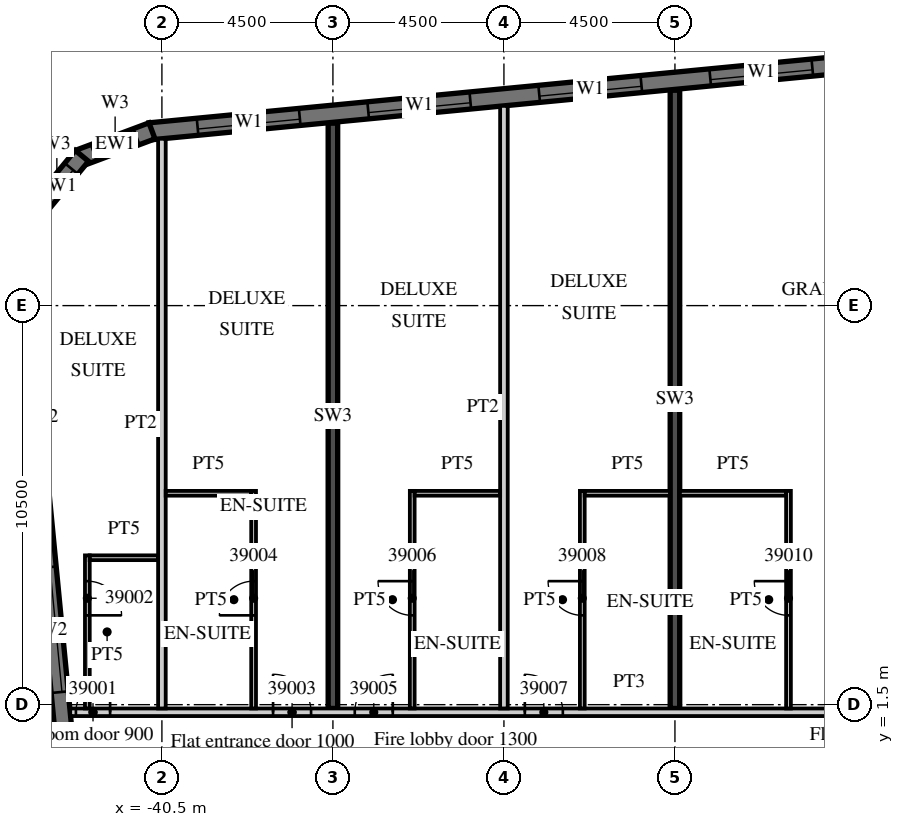
"""IFC4 building model, lengths in metres.
Left out: names, types, materials, properties, quantities, classifications, styles, units other than length and angle.
Written with IfcOpenShell. Run it as: python <this file> out.ifc"""

import sys

from ifc_helpers import new_model, si_unit, direction, frame, frame_2d, origin, place, context, subcontext, project, spatial, polyline, rectangle, outline, extrude, element, fill, save


model = new_model("IFC4")
c1 = context("Model", 3, precision=1e-05, world=origin(), true_north=direction((0.0, 1.0)))
c2 = subcontext(c1, "Body", "Model", "MODEL_VIEW")
j1 = project(units=[si_unit("LENGTHUNIT", "METRE"), si_unit("PLANEANGLEUNIT", "RADIAN")], contexts=[c1])
p1 = place(None, origin())
s1 = spatial("IfcSite", under=j1, at=p1, CompositionType="ELEMENT")
p2 = place(p1, origin())
s2 = spatial("IfcBuilding", under=s1, at=p2, CompositionType="ELEMENT")
p3 = place(p2, frame((0.0, 0.0, 170.2)))
s3 = spatial("IfcBuildingStorey", under=s2, at=p3, CompositionType="ELEMENT", Elevation=170.2)
p4 = place(p3, frame((-36.0, 1.4, 0.0), z_axis=(0.0, 0.0, 1.0), x_axis=(0.0, 1.0, 0.0)))
e1 = element("IfcWall", 1, at=p4, inside=s3, PredefinedType="SHEAR", context=c2, shape_type="SweptSolid", body=[
    extrude(rectangle(XDim=15.401, YDim=0.25, at=frame_2d((7.701, 0.0))), origin(), (0.0, 0.0, 1.0), 3.3),
])
p5 = place(p3, frame((-27.0, 1.4, 0.0), z_axis=(0.0, 0.0, 1.0), x_axis=(0.0, 1.0, 0.0)))
e2 = element("IfcWall", 2, at=p5, inside=s3, PredefinedType="SHEAR", context=c2, shape_type="SweptSolid", body=[
    extrude(rectangle(XDim=16.268, YDim=0.25, at=frame_2d((8.134, 0.0))), origin(), (0.0, 0.0, 1.0), 3.3),
])
p6 = place(p3, frame((-44.214, 12.466, 0.0), z_axis=(0.0, 0.0, 1.0), x_axis=(0.095847314626, -0.995396047952, 0.0)))
e3 = element("IfcWall", 3, at=p6, inside=s3, PredefinedType="SOLIDWALL", context=c2, shape_type="SweptSolid", body=[
    extrude(rectangle(XDim=34.0, YDim=0.45, at=frame_2d((17.0, 0.0))), origin(), (0.0, 0.0, 1.0), 3.02),
])
p7 = place(p6, frame((2.865, 0.0, 0.45)))
e4 = element("IfcOpeningElement", 4, at=p7, cuts=e3, PredefinedType="OPENING", context=c2, shape_type="SweptSolid", body=[
    extrude(rectangle(XDim=3.3, YDim=2.25, at=frame_2d((1.65, 1.125))), frame((0.0, 0.235, 0.0), z_axis=(0.0, -1.0, 0.0), x_axis=(1.0, 0.0, 0.0)), (0.0, 0.0, 1.0), 0.47),
])
p8 = place(p6, frame((7.386, 0.0, 0.45)))
e5 = element("IfcOpeningElement", 5, at=p8, cuts=e3, PredefinedType="OPENING", context=c2, shape_type="SweptSolid", body=[
    extrude(rectangle(XDim=3.3, YDim=2.25, at=frame_2d((1.65, 1.125))), frame((0.0, 0.235, 0.0), z_axis=(0.0, -1.0, 0.0), x_axis=(1.0, 0.0, 0.0)), (0.0, 0.0, 1.0), 0.47),
])
p9 = place(p3, frame((13.521, 21.817, 0.0), z_axis=(0.0, 0.0, 1.0), x_axis=(-0.995396508751, -0.095842529008, 0.0)))
e6 = element("IfcWall", 6, at=p9, inside=s3, PredefinedType="SOLIDWALL", context=c2, shape_type="SweptSolid", body=[
    extrude(rectangle(XDim=54.591, YDim=0.45, at=frame_2d((27.296, 0.0))), origin(), (0.0, 0.0, 1.0), 3.02),
])
p10 = place(p9, frame((0.91, 0.0, 0.45)))
e7 = element("IfcOpeningElement", 7, at=p10, cuts=e6, PredefinedType="OPENING", context=c2, shape_type="SweptSolid", body=[
    extrude(rectangle(XDim=2.7, YDim=2.25, at=frame_2d((1.35, 1.125))), frame((0.0, 0.235, 0.0), z_axis=(0.0, -1.0, 0.0), x_axis=(1.0, 0.0, 0.0)), (0.0, 0.0, 1.0), 0.47),
])
p11 = place(p9, frame((5.431, 0.0, 0.45)))
e8 = element("IfcOpeningElement", 8, at=p11, cuts=e6, PredefinedType="OPENING", context=c2, shape_type="SweptSolid", body=[
    extrude(rectangle(XDim=2.7, YDim=2.25, at=frame_2d((1.35, 1.125))), frame((0.0, 0.235, 0.0), z_axis=(0.0, -1.0, 0.0), x_axis=(1.0, 0.0, 0.0)), (0.0, 0.0, 1.0), 0.47),
])
p12 = place(p9, frame((9.952, 0.0, 0.45)))
e9 = element("IfcOpeningElement", 9, at=p12, cuts=e6, PredefinedType="OPENING", context=c2, shape_type="SweptSolid", body=[
    extrude(rectangle(XDim=2.7, YDim=2.25, at=frame_2d((1.35, 1.125))), frame((0.0, 0.235, 0.0), z_axis=(0.0, -1.0, 0.0), x_axis=(1.0, 0.0, 0.0)), (0.0, 0.0, 1.0), 0.47),
])
p13 = place(p9, frame((14.473, 0.0, 0.45)))
e10 = element("IfcOpeningElement", 10, at=p13, cuts=e6, PredefinedType="OPENING", context=c2, shape_type="SweptSolid", body=[
    extrude(rectangle(XDim=2.7, YDim=2.25, at=frame_2d((1.35, 1.125))), frame((0.0, 0.235, 0.0), z_axis=(0.0, -1.0, 0.0), x_axis=(1.0, 0.0, 0.0)), (0.0, 0.0, 1.0), 0.47),
])
p14 = place(p9, frame((18.994, 0.0, 0.45)))
e11 = element("IfcOpeningElement", 11, at=p14, cuts=e6, PredefinedType="OPENING", context=c2, shape_type="SweptSolid", body=[
    extrude(rectangle(XDim=2.7, YDim=2.25, at=frame_2d((1.35, 1.125))), frame((0.0, 0.235, 0.0), z_axis=(0.0, -1.0, 0.0), x_axis=(1.0, 0.0, 0.0)), (0.0, 0.0, 1.0), 0.47),
])
p15 = place(p9, frame((23.514, 0.0, 0.45)))
e12 = element("IfcOpeningElement", 12, at=p15, cuts=e6, PredefinedType="OPENING", context=c2, shape_type="SweptSolid", body=[
    extrude(rectangle(XDim=2.7, YDim=2.25, at=frame_2d((1.35, 1.125))), frame((0.0, 0.235, 0.0), z_axis=(0.0, -1.0, 0.0), x_axis=(1.0, 0.0, 0.0)), (0.0, 0.0, 1.0), 0.47),
])
p16 = place(p9, frame((28.035, 0.0, 0.45)))
e13 = element("IfcOpeningElement", 13, at=p16, cuts=e6, PredefinedType="OPENING", context=c2, shape_type="SweptSolid", body=[
    extrude(rectangle(XDim=2.7, YDim=2.25, at=frame_2d((1.35, 1.125))), frame((0.0, 0.235, 0.0), z_axis=(0.0, -1.0, 0.0), x_axis=(1.0, 0.0, 0.0)), (0.0, 0.0, 1.0), 0.47),
])
p17 = place(p9, frame((32.556, 0.0, 0.45)))
e14 = element("IfcOpeningElement", 14, at=p17, cuts=e6, PredefinedType="OPENING", context=c2, shape_type="SweptSolid", body=[
    extrude(rectangle(XDim=2.7, YDim=2.25, at=frame_2d((1.35, 1.125))), frame((0.0, 0.235, 0.0), z_axis=(0.0, -1.0, 0.0), x_axis=(1.0, 0.0, 0.0)), (0.0, 0.0, 1.0), 0.47),
])
p18 = place(p9, frame((37.077, 0.0, 0.45)))
e15 = element("IfcOpeningElement", 15, at=p18, cuts=e6, PredefinedType="OPENING", context=c2, shape_type="SweptSolid", body=[
    extrude(rectangle(XDim=2.7, YDim=2.25, at=frame_2d((1.35, 1.125))), frame((0.0, 0.235, 0.0), z_axis=(0.0, -1.0, 0.0), x_axis=(1.0, 0.0, 0.0)), (0.0, 0.0, 1.0), 0.47),
])
p19 = place(p9, frame((41.598, 0.0, 0.45)))
e16 = element("IfcOpeningElement", 16, at=p19, cuts=e6, PredefinedType="OPENING", context=c2, shape_type="SweptSolid", body=[
    extrude(rectangle(XDim=2.7, YDim=2.25, at=frame_2d((1.35, 1.125))), frame((0.0, 0.235, 0.0), z_axis=(0.0, -1.0, 0.0), x_axis=(1.0, 0.0, 0.0)), (0.0, 0.0, 1.0), 0.47),
])
p20 = place(p9, frame((46.118, 0.0, 0.45)))
e17 = element("IfcOpeningElement", 17, at=p20, cuts=e6, PredefinedType="OPENING", context=c2, shape_type="SweptSolid", body=[
    extrude(rectangle(XDim=2.7, YDim=2.25, at=frame_2d((1.35, 1.125))), frame((0.0, 0.235, 0.0), z_axis=(0.0, -1.0, 0.0), x_axis=(1.0, 0.0, 0.0)), (0.0, 0.0, 1.0), 0.47),
])
p21 = place(p9, frame((50.629, 0.0, 0.45)))
e18 = element("IfcOpeningElement", 18, at=p21, cuts=e6, PredefinedType="OPENING", context=c2, shape_type="SweptSolid", body=[
    extrude(rectangle(XDim=2.7, YDim=2.25, at=frame_2d((1.35, 1.125))), frame((0.0, 0.235, 0.0), z_axis=(0.0, -1.0, 0.0), x_axis=(1.0, 0.0, 0.0)), (0.0, 0.0, 1.0), 0.47),
])
p22 = place(p3, frame((-40.761, 16.598, 0.0), z_axis=(0.0, 0.0, 1.0), x_axis=(-0.936677599948, -0.350192909346, 0.0)))
e19 = element("IfcWall", 19, at=p22, inside=s3, PredefinedType="SOLIDWALL", context=c2, shape_type="SweptSolid", body=[
    extrude(outline(polyline([(0.0, -0.225), (2.071, -0.225), (1.95, 0.225), (0.121, 0.225), (0.0, -0.225)])), origin(), (0.0, 0.0, 1.0), 3.02),
])
p23 = place(p22, frame((0.435, 0.0, 0.45)))
e20 = element("IfcOpeningElement", 20, at=p23, cuts=e19, PredefinedType="OPENING", context=c2, shape_type="SweptSolid", body=[
    extrude(rectangle(XDim=1.2, YDim=2.25, at=frame_2d((0.6, 1.125))), frame((0.0, 0.235, 0.0), z_axis=(0.0, -1.0, 0.0), x_axis=(1.0, 0.0, 0.0)), (0.0, 0.0, 1.0), 0.47),
])
p24 = place(p3, frame((-42.606, 15.941, 0.0), z_axis=(0.0, 0.0, 1.0), x_axis=(-0.636116318187, -0.771593176315, 0.0)))
e21 = element("IfcWall", 21, at=p24, inside=s3, PredefinedType="SOLIDWALL", context=c2, shape_type="SweptSolid", body=[
    extrude(outline(polyline([(0.0, -0.225), (2.071, -0.225), (1.95, 0.225), (0.121, 0.225), (0.0, -0.225)])), origin(), (0.0, 0.0, 1.0), 3.02),
])
p25 = place(p24, frame((0.435, 0.0, 0.45)))
e22 = element("IfcOpeningElement", 22, at=p25, cuts=e21, PredefinedType="OPENING", context=c2, shape_type="SweptSolid", body=[
    extrude(rectangle(XDim=1.2, YDim=2.25, at=frame_2d((0.6, 1.125))), frame((0.0, 0.235, 0.0), z_axis=(0.0, -1.0, 0.0), x_axis=(1.0, 0.0, 0.0)), (0.0, 0.0, 1.0), 0.47),
])
p26 = place(p3, frame((-42.913, 1.3, 0.0), z_axis=(0.0, 0.0, 1.0), x_axis=(1.0, 0.0, 0.0)))
e23 = element("IfcWall", 23, at=p26, inside=s3, PredefinedType="PARTITIONING", context=c2, shape_type="SweptSolid", body=[
    extrude(rectangle(XDim=29.413, YDim=0.2, at=frame_2d((14.707, 0.0))), origin(), (0.0, 0.0, 1.0), 3.02),
])
p27 = place(p26, frame((0.15, 0.0, 0.0)))
e24 = element("IfcOpeningElement", 24, at=p27, cuts=e23, PredefinedType="OPENING", context=c2, shape_type="SweptSolid", body=[
    extrude(rectangle(XDim=0.9, YDim=2.1, at=frame_2d((0.45, 1.05))), frame((0.0, 0.11, 0.0), z_axis=(0.0, -1.0, 0.0), x_axis=(1.0, 0.0, 0.0)), (0.0, 0.0, 1.0), 0.22),
])
p28 = place(p26, frame((5.338, 0.0, 0.0)))
e25 = element("IfcOpeningElement", 25, at=p28, cuts=e23, PredefinedType="OPENING", context=c2, shape_type="SweptSolid", body=[
    extrude(rectangle(XDim=1.0, YDim=2.1, at=frame_2d((0.5, 1.05))), frame((0.0, 0.11, 0.0), z_axis=(0.0, -1.0, 0.0), x_axis=(1.0, 0.0, 0.0)), (0.0, 0.0, 1.0), 0.22),
])
p29 = place(p26, frame((7.488, 0.0, 0.0)))
e26 = element("IfcOpeningElement", 26, at=p29, cuts=e23, PredefinedType="OPENING", context=c2, shape_type="SweptSolid", body=[
    extrude(rectangle(XDim=1.0, YDim=2.1, at=frame_2d((0.5, 1.05))), frame((0.0, 0.11, 0.0), z_axis=(0.0, -1.0, 0.0), x_axis=(1.0, 0.0, 0.0)), (0.0, 0.0, 1.0), 0.22),
])
p30 = place(p26, frame((11.963, 0.0, 0.0)))
e27 = element("IfcOpeningElement", 27, at=p30, cuts=e23, PredefinedType="OPENING", context=c2, shape_type="SweptSolid", body=[
    extrude(rectangle(XDim=1.0, YDim=2.1, at=frame_2d((0.5, 1.05))), frame((0.0, 0.11, 0.0), z_axis=(0.0, -1.0, 0.0), x_axis=(1.0, 0.0, 0.0)), (0.0, 0.0, 1.0), 0.22),
])
p31 = place(p26, frame((21.275, 0.0, 0.0)))
e28 = element("IfcOpeningElement", 28, at=p31, cuts=e23, PredefinedType="OPENING", context=c2, shape_type="SweptSolid", body=[
    extrude(rectangle(XDim=1.2, YDim=2.1, at=frame_2d((0.6, 1.05))), frame((0.0, 0.11, 0.0), z_axis=(0.0, -1.0, 0.0), x_axis=(1.0, 0.0, 0.0)), (0.0, 0.0, 1.0), 0.22),
])
p32 = place(p26, frame((27.838, 0.0, 0.0)))
e29 = element("IfcOpeningElement", 29, at=p32, cuts=e23, PredefinedType="OPENING", context=c2, shape_type="SweptSolid", body=[
    extrude(rectangle(XDim=1.0, YDim=2.1, at=frame_2d((0.5, 1.05))), frame((0.0, 0.11, 0.0), z_axis=(0.0, -1.0, 0.0), x_axis=(1.0, 0.0, 0.0)), (0.0, 0.0, 1.0), 0.22),
])
p33 = place(p3, frame((-40.5, 1.4, 0.0), z_axis=(0.0, 0.0, 1.0), x_axis=(0.0, 1.0, 0.0)))
e30 = element("IfcWall", 30, at=p33, inside=s3, PredefinedType="PARTITIONING", context=c2, shape_type="SweptSolid", body=[
    extrude(rectangle(XDim=14.99, YDim=0.2, at=frame_2d((7.495, 0.0))), origin(), (0.0, 0.0, 1.0), 3.02),
])
p34 = place(p3, frame((-42.462, 1.4, 0.0), z_axis=(0.0, 0.0, 1.0), x_axis=(0.0, 1.0, 0.0)))
e31 = element("IfcWall", 31, at=p34, inside=s3, PredefinedType="PARTITIONING", context=c2, shape_type="SweptSolid", body=[
    extrude(rectangle(XDim=4.028, YDim=0.125, at=frame_2d((2.014, 0.0))), origin(), (0.0, 0.0, 1.0), 3.02),
])
p35 = place(p34, frame((2.45, 0.0, 0.0)))
e32 = element("IfcOpeningElement", 32, at=p35, cuts=e31, PredefinedType="OPENING", context=c2, shape_type="SweptSolid", body=[
    extrude(rectangle(XDim=0.9, YDim=2.1, at=frame_2d((0.45, 1.05))), frame((0.0, 0.073, 0.0), z_axis=(0.0, -1.0, 0.0), x_axis=(1.0, 0.0, 0.0)), (0.0, 0.0, 1.0), 0.145),
])
p36 = place(p3, frame((-42.4, 5.366, 0.0), z_axis=(0.0, 0.0, 1.0), x_axis=(1.0, 0.0, 0.0)))
e33 = element("IfcWall", 33, at=p36, inside=s3, PredefinedType="PARTITIONING", context=c2, shape_type="SweptSolid", body=[
    extrude(rectangle(XDim=1.8, YDim=0.125, at=frame_2d((0.9, 0.0))), origin(), (0.0, 0.0, 1.0), 3.02),
])
p37 = place(p3, frame((-38.087, 1.4, 0.0), z_axis=(0.0, 0.0, 1.0), x_axis=(0.0, 1.0, 0.0)))
e34 = element("IfcWall", 34, at=p37, inside=s3, PredefinedType="PARTITIONING", context=c2, shape_type="SweptSolid", body=[
    extrude(rectangle(XDim=5.725, YDim=0.125, at=frame_2d((2.863, 0.0))), origin(), (0.0, 0.0, 1.0), 3.02),
])
p38 = place(p37, frame((2.45, 0.0, 0.0)))
e35 = element("IfcOpeningElement", 35, at=p38, cuts=e34, PredefinedType="OPENING", context=c2, shape_type="SweptSolid", body=[
    extrude(rectangle(XDim=0.9, YDim=2.1, at=frame_2d((0.45, 1.05))), frame((0.0, 0.073, 0.0), z_axis=(0.0, -1.0, 0.0), x_axis=(1.0, 0.0, 0.0)), (0.0, 0.0, 1.0), 0.145),
])
p39 = place(p3, frame((-40.4, 7.062, 0.0), z_axis=(0.0, 0.0, 1.0), x_axis=(1.0, 0.0, 0.0)))
e36 = element("IfcWall", 36, at=p39, inside=s3, PredefinedType="PARTITIONING", context=c2, shape_type="SweptSolid", body=[
    extrude(rectangle(XDim=2.25, YDim=0.125, at=frame_2d((1.125, 0.0))), origin(), (0.0, 0.0, 1.0), 3.02),
])
p40 = place(p3, frame((-31.5, 1.4, 0.0), z_axis=(0.0, 0.0, 1.0), x_axis=(0.0, 1.0, 0.0)))
e37 = element("IfcWall", 37, at=p40, inside=s3, PredefinedType="PARTITIONING", context=c2, shape_type="SweptSolid", body=[
    extrude(rectangle(XDim=15.856, YDim=0.2, at=frame_2d((7.928, 0.0))), origin(), (0.0, 0.0, 1.0), 3.02),
])
p41 = place(p3, frame((-33.913, 1.4, 0.0), z_axis=(0.0, 0.0, 1.0), x_axis=(0.0, 1.0, 0.0)))
e38 = element("IfcWall", 38, at=p41, inside=s3, PredefinedType="PARTITIONING", context=c2, shape_type="SweptSolid", body=[
    extrude(rectangle(XDim=5.725, YDim=0.125, at=frame_2d((2.863, 0.0))), origin(), (0.0, 0.0, 1.0), 3.02),
])
p42 = place(p41, frame((2.45, 0.0, 0.0)))
e39 = element("IfcOpeningElement", 39, at=p42, cuts=e38, PredefinedType="OPENING", context=c2, shape_type="SweptSolid", body=[
    extrude(rectangle(XDim=0.9, YDim=2.1, at=frame_2d((0.45, 1.05))), frame((0.0, 0.073, 0.0), z_axis=(0.0, -1.0, 0.0), x_axis=(1.0, 0.0, 0.0)), (0.0, 0.0, 1.0), 0.145),
])
p43 = place(p3, frame((-33.85, 7.062, 0.0), z_axis=(0.0, 0.0, 1.0), x_axis=(1.0, 0.0, 0.0)))
e40 = element("IfcWall", 40, at=p43, inside=s3, PredefinedType="PARTITIONING", context=c2, shape_type="SweptSolid", body=[
    extrude(rectangle(XDim=2.25, YDim=0.125, at=frame_2d((1.125, 0.0))), origin(), (0.0, 0.0, 1.0), 3.02),
])
p44 = place(p3, frame((-29.438, 1.4, 0.0), z_axis=(0.0, 0.0, 1.0), x_axis=(0.0, 1.0, 0.0)))
e41 = element("IfcWall", 41, at=p44, inside=s3, PredefinedType="PARTITIONING", context=c2, shape_type="SweptSolid", body=[
    extrude(rectangle(XDim=5.725, YDim=0.125, at=frame_2d((2.863, 0.0))), origin(), (0.0, 0.0, 1.0), 3.02),
])
p45 = place(p44, frame((2.45, 0.0, 0.0)))
e42 = element("IfcOpeningElement", 42, at=p45, cuts=e41, PredefinedType="OPENING", context=c2, shape_type="SweptSolid", body=[
    extrude(rectangle(XDim=0.9, YDim=2.1, at=frame_2d((0.45, 1.05))), frame((0.0, 0.073, 0.0), z_axis=(0.0, -1.0, 0.0), x_axis=(1.0, 0.0, 0.0)), (0.0, 0.0, 1.0), 0.145),
])
p46 = place(p3, frame((-29.375, 7.062, 0.0), z_axis=(0.0, 0.0, 1.0), x_axis=(1.0, 0.0, 0.0)))
e43 = element("IfcWall", 43, at=p46, inside=s3, PredefinedType="PARTITIONING", context=c2, shape_type="SweptSolid", body=[
    extrude(rectangle(XDim=2.25, YDim=0.125, at=frame_2d((1.125, 0.0))), origin(), (0.0, 0.0, 1.0), 3.02),
])
p47 = place(p3, frame((-24.012, 1.4, 0.0), z_axis=(0.0, 0.0, 1.0), x_axis=(0.0, 1.0, 0.0)))
e44 = element("IfcWall", 44, at=p47, inside=s3, PredefinedType="PARTITIONING", context=c2, shape_type="SweptSolid", body=[
    extrude(rectangle(XDim=5.725, YDim=0.125, at=frame_2d((2.863, 0.0))), origin(), (0.0, 0.0, 1.0), 3.02),
])
p48 = place(p47, frame((2.45, 0.0, 0.0)))
e45 = element("IfcOpeningElement", 45, at=p48, cuts=e44, PredefinedType="OPENING", context=c2, shape_type="SweptSolid", body=[
    extrude(rectangle(XDim=0.9, YDim=2.1, at=frame_2d((0.45, 1.05))), frame((0.0, 0.073, 0.0), z_axis=(0.0, -1.0, 0.0), x_axis=(1.0, 0.0, 0.0)), (0.0, 0.0, 1.0), 0.145),
])
p49 = place(p3, frame((-26.875, 7.062, 0.0), z_axis=(0.0, 0.0, 1.0), x_axis=(1.0, 0.0, 0.0)))
e46 = element("IfcWall", 46, at=p49, inside=s3, PredefinedType="PARTITIONING", context=c2, shape_type="SweptSolid", body=[
    extrude(rectangle(XDim=2.8, YDim=0.125, at=frame_2d((1.4, 0.0))), origin(), (0.0, 0.0, 1.0), 3.02),
])
p50 = place(p8, origin())
e47 = element("IfcWindow", 47, at=p50, inside=s3, PartitioningType="SINGLE_PANEL", PredefinedType="WINDOW", context=c2, shape_type="SweptSolid", body=[
    extrude(rectangle(XDim=3.3, YDim=2.25, at=frame_2d((1.65, 1.125))), frame((0.0, 0.09, 0.0), z_axis=(0.0, -1.0, 0.0), x_axis=(1.0, 0.0, 0.0)), (0.0, 0.0, 1.0), 0.06),
])
fill(e5, e47)
p51 = place(p18, origin())
e48 = element("IfcWindow", 48, at=p51, inside=s3, PartitioningType="SINGLE_PANEL", PredefinedType="WINDOW", context=c2, shape_type="SweptSolid", body=[
    extrude(rectangle(XDim=2.7, YDim=2.25, at=frame_2d((1.35, 1.125))), frame((0.0, 0.09, 0.0), z_axis=(0.0, -1.0, 0.0), x_axis=(1.0, 0.0, 0.0)), (0.0, 0.0, 1.0), 0.06),
])
fill(e15, e48)
p52 = place(p19, origin())
e49 = element("IfcWindow", 49, at=p52, inside=s3, PartitioningType="SINGLE_PANEL", PredefinedType="WINDOW", context=c2, shape_type="SweptSolid", body=[
    extrude(rectangle(XDim=2.7, YDim=2.25, at=frame_2d((1.35, 1.125))), frame((0.0, 0.09, 0.0), z_axis=(0.0, -1.0, 0.0), x_axis=(1.0, 0.0, 0.0)), (0.0, 0.0, 1.0), 0.06),
])
fill(e16, e49)
p53 = place(p20, origin())
e50 = element("IfcWindow", 50, at=p53, inside=s3, PartitioningType="SINGLE_PANEL", PredefinedType="WINDOW", context=c2, shape_type="SweptSolid", body=[
    extrude(rectangle(XDim=2.7, YDim=2.25, at=frame_2d((1.35, 1.125))), frame((0.0, 0.09, 0.0), z_axis=(0.0, -1.0, 0.0), x_axis=(1.0, 0.0, 0.0)), (0.0, 0.0, 1.0), 0.06),
])
fill(e17, e50)
p54 = place(p21, origin())
e51 = element("IfcWindow", 51, at=p54, inside=s3, PartitioningType="SINGLE_PANEL", PredefinedType="WINDOW", context=c2, shape_type="SweptSolid", body=[
    extrude(rectangle(XDim=2.7, YDim=2.25, at=frame_2d((1.35, 1.125))), frame((0.0, 0.09, 0.0), z_axis=(0.0, -1.0, 0.0), x_axis=(1.0, 0.0, 0.0)), (0.0, 0.0, 1.0), 0.06),
])
fill(e18, e51)
p55 = place(p23, origin())
e52 = element("IfcWindow", 52, at=p55, inside=s3, PartitioningType="SINGLE_PANEL", PredefinedType="WINDOW", context=c2, shape_type="SweptSolid", body=[
    extrude(rectangle(XDim=1.2, YDim=2.25, at=frame_2d((0.6, 1.125))), frame((0.0, 0.09, 0.0), z_axis=(0.0, -1.0, 0.0), x_axis=(1.0, 0.0, 0.0)), (0.0, 0.0, 1.0), 0.06),
])
fill(e20, e52)
p56 = place(p25, origin())
e53 = element("IfcWindow", 53, at=p56, inside=s3, PartitioningType="SINGLE_PANEL", PredefinedType="WINDOW", context=c2, shape_type="SweptSolid", body=[
    extrude(rectangle(XDim=1.2, YDim=2.25, at=frame_2d((0.6, 1.125))), frame((0.0, 0.09, 0.0), z_axis=(0.0, -1.0, 0.0), x_axis=(1.0, 0.0, 0.0)), (0.0, 0.0, 1.0), 0.06),
])
fill(e22, e53)
p57 = place(p27, origin())
e54 = element("IfcDoor", 54, at=p57, inside=s3, OperationType="SINGLE_SWING_RIGHT", PredefinedType="DOOR", context=c2, shape_type="SweptSolid", body=[
    extrude(rectangle(XDim=0.9, YDim=2.1, at=frame_2d((0.45, 1.05))), frame((0.0, 0.025, 0.0), z_axis=(0.0, -1.0, 0.0), x_axis=(1.0, 0.0, 0.0)), (0.0, 0.0, 1.0), 0.05),
])
fill(e24, e54)
p58 = place(p35, origin())
e55 = element("IfcDoor", 55, at=p58, inside=s3, OperationType="SINGLE_SWING_LEFT", PredefinedType="DOOR", context=c2, shape_type="SweptSolid", body=[
    extrude(rectangle(XDim=0.9, YDim=2.1, at=frame_2d((0.45, 1.05))), frame((0.0, 0.025, 0.0), z_axis=(0.0, -1.0, 0.0), x_axis=(1.0, 0.0, 0.0)), (0.0, 0.0, 1.0), 0.05),
])
fill(e32, e55)
p59 = place(p28, origin())
e56 = element("IfcDoor", 56, at=p59, inside=s3, OperationType="SINGLE_SWING_LEFT", PredefinedType="DOOR", context=c2, shape_type="SweptSolid", body=[
    extrude(rectangle(XDim=1.0, YDim=2.1, at=frame_2d((0.5, 1.05))), frame((0.0, 0.025, 0.0), z_axis=(0.0, -1.0, 0.0), x_axis=(1.0, 0.0, 0.0)), (0.0, 0.0, 1.0), 0.05),
])
fill(e25, e56)
p60 = place(p38, origin())
e57 = element("IfcDoor", 57, at=p60, inside=s3, OperationType="SINGLE_SWING_LEFT", PredefinedType="DOOR", context=c2, shape_type="SweptSolid", body=[
    extrude(rectangle(XDim=0.9, YDim=2.1, at=frame_2d((0.45, 1.05))), frame((0.0, 0.025, 0.0), z_axis=(0.0, -1.0, 0.0), x_axis=(1.0, 0.0, 0.0)), (0.0, 0.0, 1.0), 0.05),
])
fill(e35, e57)
p61 = place(p29, origin())
e58 = element("IfcDoor", 58, at=p61, inside=s3, OperationType="SINGLE_SWING_RIGHT", PredefinedType="DOOR", context=c2, shape_type="SweptSolid", body=[
    extrude(rectangle(XDim=1.0, YDim=2.1, at=frame_2d((0.5, 1.05))), frame((0.0, 0.025, 0.0), z_axis=(0.0, -1.0, 0.0), x_axis=(1.0, 0.0, 0.0)), (0.0, 0.0, 1.0), 0.05),
])
fill(e26, e58)
p62 = place(p42, origin())
e59 = element("IfcDoor", 59, at=p62, inside=s3, OperationType="SINGLE_SWING_RIGHT", PredefinedType="DOOR", context=c2, shape_type="SweptSolid", body=[
    extrude(rectangle(XDim=0.9, YDim=2.1, at=frame_2d((0.45, 1.05))), frame((0.0, 0.025, 0.0), z_axis=(0.0, -1.0, 0.0), x_axis=(1.0, 0.0, 0.0)), (0.0, 0.0, 1.0), 0.05),
])
fill(e39, e59)
p63 = place(p30, origin())
e60 = element("IfcDoor", 60, at=p63, inside=s3, OperationType="SINGLE_SWING_LEFT", PredefinedType="DOOR", context=c2, shape_type="SweptSolid", body=[
    extrude(rectangle(XDim=1.0, YDim=2.1, at=frame_2d((0.5, 1.05))), frame((0.0, 0.025, 0.0), z_axis=(0.0, -1.0, 0.0), x_axis=(1.0, 0.0, 0.0)), (0.0, 0.0, 1.0), 0.05),
])
fill(e27, e60)
p64 = place(p45, origin())
e61 = element("IfcDoor", 61, at=p64, inside=s3, OperationType="SINGLE_SWING_RIGHT", PredefinedType="DOOR", context=c2, shape_type="SweptSolid", body=[
    extrude(rectangle(XDim=0.9, YDim=2.1, at=frame_2d((0.45, 1.05))), frame((0.0, 0.025, 0.0), z_axis=(0.0, -1.0, 0.0), x_axis=(1.0, 0.0, 0.0)), (0.0, 0.0, 1.0), 0.05),
])
fill(e42, e61)
p65 = place(p48, origin())
e62 = element("IfcDoor", 62, at=p65, inside=s3, OperationType="SINGLE_SWING_RIGHT", PredefinedType="DOOR", context=c2, shape_type="SweptSolid", body=[
    extrude(rectangle(XDim=0.9, YDim=2.1, at=frame_2d((0.45, 1.05))), frame((0.0, 0.025, 0.0), z_axis=(0.0, -1.0, 0.0), x_axis=(1.0, 0.0, 0.0)), (0.0, 0.0, 1.0), 0.05),
])
fill(e45, e62)
save(model, sys.argv[1])
